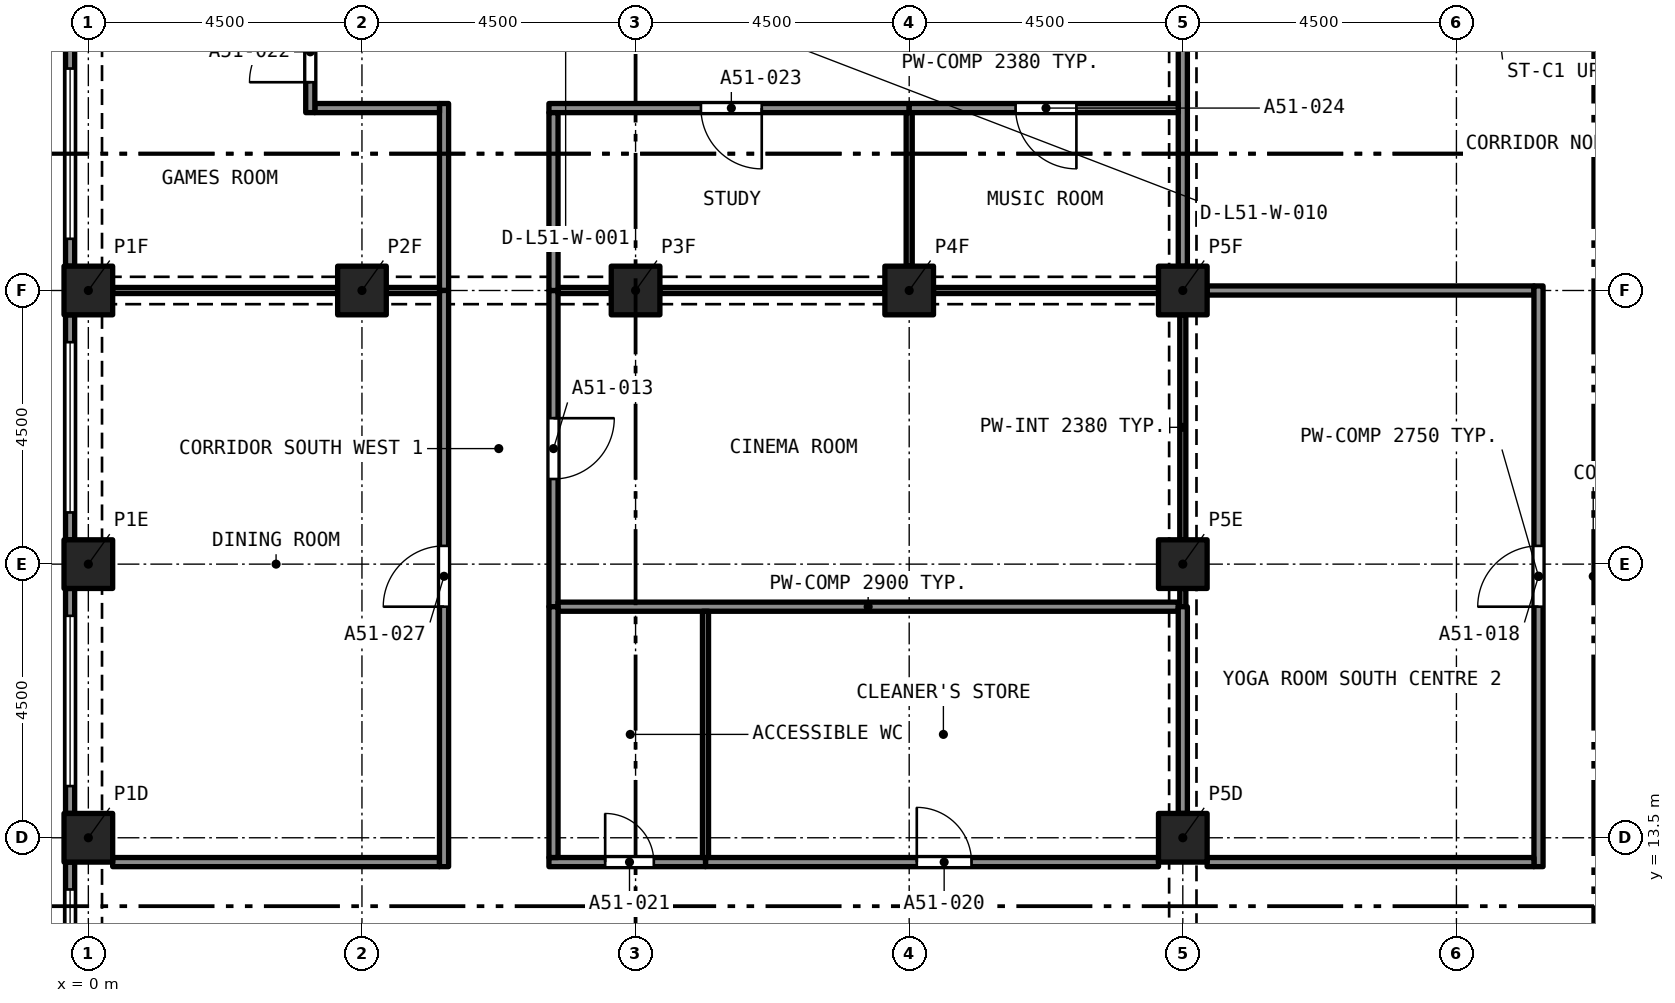
"""IFC4 building model, lengths in metres.
Left out: names, types, materials, properties, quantities, classifications, styles, units other than length and angle.
Written with IfcOpenShell. Run it as: python <this file> out.ifc"""

import sys

from ifc_helpers import new_model, si_unit, direction, frame, frame_2d, origin, origin_2d, place, context, subcontext, project, spatial, rectangle, extrude, element, fill, save


model = new_model("IFC4")
c1 = context("Model", 3, precision=1e-05, world=origin(), true_north=direction((0.0, 1.0)))
c2 = subcontext(c1, "Body", "Model", "MODEL_VIEW")
j1 = project(units=[si_unit("LENGTHUNIT", "METRE"), si_unit("PLANEANGLEUNIT", "RADIAN")], contexts=[c1])
p1 = place(None, origin())
s1 = spatial("IfcSite", under=j1, at=p1, CompositionType="ELEMENT")
p2 = place(p1, origin())
s2 = spatial("IfcBuilding", under=s1, at=p2, CompositionType="ELEMENT")
p3 = place(p2, frame((0.0, 0.0, 185.9)))
s3 = spatial("IfcBuildingStorey", under=s2, at=p3, CompositionType="ELEMENT", Elevation=185.9)
for number, where, z_axis, x_axis in (
    (1, (0.0, 13.5, 0.0), (0.0, 0.0, 1.0), (1.0, 0.0, 0.0)),
    (2, (18.0, 13.5, 0.0), (0.0, 0.0, 1.0), (1.0, 0.0, 0.0)),
    (3, (0.0, 18.0, 0.0), (0.0, 0.0, 1.0), (1.0, 0.0, 0.0)),
    (4, (18.0, 18.0, 0.0), (0.0, 0.0, 1.0), (1.0, 0.0, 0.0)),
    (5, (0.0, 22.5, 0.0), (0.0, 0.0, 1.0), (1.0, 0.0, 0.0)),
    (6, (4.5, 22.5, 0.0), (0.0, 0.0, 1.0), (1.0, 0.0, 0.0)),
    (7, (9.0, 22.5, 0.0), (0.0, 0.0, 1.0), (1.0, 0.0, 0.0)),
    (8, (13.5, 22.5, 0.0), (0.0, 0.0, 1.0), (1.0, 0.0, 0.0)),
    (9, (18.0, 22.5, 0.0), (0.0, 0.0, 1.0), (1.0, 0.0, 0.0)),
):
    element("IfcColumn", number, at=place(p3, frame(where, z_axis=z_axis, x_axis=x_axis)), inside=s3, PredefinedType="COLUMN", context=c2, shape_type="SweptSolid", body=[
        extrude(rectangle(XDim=0.8, YDim=0.8, at=origin_2d()), origin(), (0.0, 0.0, 1.0), 3.2),
    ])
p4 = place(p3, frame((-0.3, 22.9, 0.0), z_axis=(0.0, 0.0, 1.0), x_axis=(0.0, 1.0, 0.0)))
e10 = element("IfcWall", 10, at=p4, inside=s3, PredefinedType="SOLIDWALL", context=c2, shape_type="SweptSolid", body=[
    extrude(rectangle(XDim=3.7, YDim=0.15, at=frame_2d((1.85, 0.0))), origin(), (0.0, 0.0, 1.0), 3.2),
])
p5 = place(p4, frame((0.45, 0.0, 0.45)))
e11 = element("IfcOpeningElement", 11, at=p5, cuts=e10, PredefinedType="OPENING", context=c2, shape_type="SweptSolid", body=[
    extrude(rectangle(XDim=2.8, YDim=1.95, at=frame_2d((1.4, 0.975))), frame((0.0, 0.085, 0.0), z_axis=(0.0, -1.0, 0.0), x_axis=(1.0, 0.0, 0.0)), (0.0, 0.0, 1.0), 0.17),
])
p6 = place(p3, frame((-0.3, 18.4, 0.0), z_axis=(0.0, 0.0, 1.0), x_axis=(0.0, 1.0, 0.0)))
e12 = element("IfcWall", 12, at=p6, inside=s3, PredefinedType="SOLIDWALL", context=c2, shape_type="SweptSolid", body=[
    extrude(rectangle(XDim=3.7, YDim=0.15, at=frame_2d((1.85, 0.0))), origin(), (0.0, 0.0, 1.0), 3.2),
])
p7 = place(p6, frame((0.45, 0.0, 0.45)))
e13 = element("IfcOpeningElement", 13, at=p7, cuts=e12, PredefinedType="OPENING", context=c2, shape_type="SweptSolid", body=[
    extrude(rectangle(XDim=2.8, YDim=1.95, at=frame_2d((1.4, 0.975))), frame((0.0, 0.085, 0.0), z_axis=(0.0, -1.0, 0.0), x_axis=(1.0, 0.0, 0.0)), (0.0, 0.0, 1.0), 0.17),
])
p8 = place(p3, frame((-0.3, 13.9, 0.0), z_axis=(0.0, 0.0, 1.0), x_axis=(0.0, 1.0, 0.0)))
e14 = element("IfcWall", 14, at=p8, inside=s3, PredefinedType="SOLIDWALL", context=c2, shape_type="SweptSolid", body=[
    extrude(rectangle(XDim=3.7, YDim=0.15, at=frame_2d((1.85, 0.0))), origin(), (0.0, 0.0, 1.0), 3.2),
])
p9 = place(p8, frame((0.45, 0.0, 0.45)))
e15 = element("IfcOpeningElement", 15, at=p9, cuts=e14, PredefinedType="OPENING", context=c2, shape_type="SweptSolid", body=[
    extrude(rectangle(XDim=2.8, YDim=1.95, at=frame_2d((1.4, 0.975))), frame((0.0, 0.085, 0.0), z_axis=(0.0, -1.0, 0.0), x_axis=(1.0, 0.0, 0.0)), (0.0, 0.0, 1.0), 0.17),
])
p10 = place(p3, frame((-0.3, 9.4, 0.0), z_axis=(0.0, 0.0, 1.0), x_axis=(0.0, 1.0, 0.0)))
e16 = element("IfcWall", 16, at=p10, inside=s3, PredefinedType="SOLIDWALL", context=c2, shape_type="SweptSolid", body=[
    extrude(rectangle(XDim=3.7, YDim=0.15, at=frame_2d((1.85, 0.0))), origin(), (0.0, 0.0, 1.0), 3.2),
])
p11 = place(p10, frame((0.45, 0.0, 0.45)))
e17 = element("IfcOpeningElement", 17, at=p11, cuts=e16, PredefinedType="OPENING", context=c2, shape_type="SweptSolid", body=[
    extrude(rectangle(XDim=2.8, YDim=1.95, at=frame_2d((1.4, 0.975))), frame((0.0, 0.085, 0.0), z_axis=(0.0, -1.0, 0.0), x_axis=(1.0, 0.0, 0.0)), (0.0, 0.0, 1.0), 0.17),
])
p12 = place(p3, frame((18.0, 18.4, 0.0), z_axis=(0.0, 0.0, 1.0), x_axis=(0.0, 1.0, 0.0)))
e18 = element("IfcWall", 18, at=p12, inside=s3, PredefinedType="PARTITIONING", context=c2, shape_type="SweptSolid", body=[
    extrude(rectangle(XDim=3.7, YDim=0.1, at=frame_2d((1.85, 0.0))), origin(), (0.0, 0.0, 1.0), 2.38),
])
p13 = place(p3, frame((18.0, 17.3, 0.0), z_axis=(0.0, 0.0, 1.0), x_axis=(0.0, 1.0, 0.0)))
e19 = element("IfcWall", 19, at=p13, inside=s3, PredefinedType="PARTITIONING", context=c2, shape_type="SweptSolid", body=[
    extrude(rectangle(XDim=0.3, YDim=0.1, at=frame_2d((0.15, 0.0))), origin(), (0.0, 0.0, 1.0), 2.75),
])
p14 = place(p3, frame((7.65, 22.5, 0.0), z_axis=(0.0, 0.0, 1.0), x_axis=(0.0, -1.0, 0.0)))
e20 = element("IfcWall", 20, at=p14, inside=s3, PredefinedType="PARTITIONING", context=c2, shape_type="SweptSolid", body=[
    extrude(rectangle(XDim=5.2, YDim=0.15, at=frame_2d((2.6, 0.0))), origin(), (0.0, 0.0, 1.0), 2.9),
])
p15 = place(p14, frame((2.1, 0.0, 0.0)))
e21 = element("IfcOpeningElement", 21, at=p15, cuts=e20, PredefinedType="OPENING", context=c2, shape_type="SweptSolid", body=[
    extrude(rectangle(XDim=1.0, YDim=2.1, at=frame_2d((0.5, 1.05))), frame((0.0, 0.085, 0.0), z_axis=(0.0, -1.0, 0.0), x_axis=(1.0, 0.0, 0.0)), (0.0, 0.0, 1.0), 0.17),
])
p16 = place(p3, frame((7.725, 22.5, 0.0), z_axis=(0.0, 0.0, 1.0), x_axis=(1.0, 0.0, 0.0)))
e22 = element("IfcWall", 22, at=p16, inside=s3, PredefinedType="PARTITIONING", context=c2, shape_type="SweptSolid", body=[
    extrude(rectangle(XDim=0.875, YDim=0.1, at=frame_2d((0.438, 0.0))), origin(), (0.0, 0.0, 1.0), 2.38),
])
for number, where, z_axis, x_axis in (
    (23, (9.4, 22.5, 0.0), (0.0, 0.0, 1.0), (1.0, 0.0, 0.0)),
    (24, (13.9, 22.5, 0.0), (0.0, 0.0, 1.0), (1.0, 0.0, 0.0)),
):
    element("IfcWall", number, at=place(p3, frame(where, z_axis=z_axis, x_axis=x_axis)), inside=s3, PredefinedType="PARTITIONING", context=c2, shape_type="SweptSolid", body=[
        extrude(rectangle(XDim=3.7, YDim=0.1, at=frame_2d((1.85, 0.0))), origin(), (0.0, 0.0, 1.0), 2.38),
    ])
p17 = place(p3, frame((7.725, 17.3, 0.0), z_axis=(0.0, 0.0, 1.0), x_axis=(1.0, 0.0, 0.0)))
e25 = element("IfcWall", 25, at=p17, inside=s3, PredefinedType="PARTITIONING", context=c2, shape_type="SweptSolid", body=[
    extrude(rectangle(XDim=10.2, YDim=0.15, at=frame_2d((5.1, 0.0))), origin(), (0.0, 0.0, 1.0), 2.9),
])
p18 = place(p3, frame((18.4, 22.5, 0.0), z_axis=(0.0, 0.0, 1.0), x_axis=(1.0, 0.0, 0.0)))
e26 = element("IfcWall", 26, at=p18, inside=s3, PredefinedType="PARTITIONING", context=c2, shape_type="SweptSolid", body=[
    extrude(rectangle(XDim=5.375, YDim=0.15, at=frame_2d((2.688, 0.0))), origin(), (0.0, 0.0, 1.0), 2.75),
])
p19 = place(p3, frame((18.0, 22.9, 0.0), z_axis=(0.0, 0.0, 1.0), x_axis=(0.0, 1.0, 0.0)))
e27 = element("IfcWall", 27, at=p19, inside=s3, PredefinedType="PARTITIONING", context=c2, shape_type="SweptSolid", body=[
    extrude(rectangle(XDim=3.7, YDim=0.15, at=frame_2d((1.85, 0.0))), origin(), (0.0, 0.0, 1.0), 2.38),
])
p20 = place(p3, frame((23.85, 13.025, 0.0), z_axis=(0.0, 0.0, 1.0), x_axis=(0.0, 1.0, 0.0)))
e28 = element("IfcWall", 28, at=p20, inside=s3, PredefinedType="PARTITIONING", context=c2, shape_type="SweptSolid", body=[
    extrude(rectangle(XDim=9.55, YDim=0.15, at=frame_2d((4.775, 0.0))), origin(), (0.0, 0.0, 1.0), 2.75),
])
p21 = place(p20, frame((4.275, 0.0, 0.0)))
e29 = element("IfcOpeningElement", 29, at=p21, cuts=e28, PredefinedType="OPENING", context=c2, shape_type="SweptSolid", body=[
    extrude(rectangle(XDim=1.0, YDim=2.1, at=frame_2d((0.5, 1.05))), frame((0.0, 0.085, 0.0), z_axis=(0.0, -1.0, 0.0), x_axis=(1.0, 0.0, 0.0)), (0.0, 0.0, 1.0), 0.17),
])
p22 = place(p3, frame((18.4, 13.1, 0.0), z_axis=(0.0, 0.0, 1.0), x_axis=(1.0, 0.0, 0.0)))
e30 = element("IfcWall", 30, at=p22, inside=s3, PredefinedType="PARTITIONING", context=c2, shape_type="SweptSolid", body=[
    extrude(rectangle(XDim=5.375, YDim=0.15, at=frame_2d((2.688, 0.0))), origin(), (0.0, 0.0, 1.0), 2.75),
])
p23 = place(p3, frame((10.15, 13.1, 0.0), z_axis=(0.0, 0.0, 1.0), x_axis=(1.0, 0.0, 0.0)))
e31 = element("IfcWall", 31, at=p23, inside=s3, PredefinedType="PARTITIONING", context=c2, shape_type="SweptSolid", body=[
    extrude(rectangle(XDim=7.45, YDim=0.15, at=frame_2d((3.725, 0.0))), origin(), (0.0, 0.0, 1.0), 2.9),
])
p24 = place(p23, frame((3.475, 0.0, 0.0)))
e32 = element("IfcOpeningElement", 32, at=p24, cuts=e31, PredefinedType="OPENING", context=c2, shape_type="SweptSolid", body=[
    extrude(rectangle(XDim=0.9, YDim=2.1, at=frame_2d((0.45, 1.05))), frame((0.0, 0.085, 0.0), z_axis=(0.0, -1.0, 0.0), x_axis=(1.0, 0.0, 0.0)), (0.0, 0.0, 1.0), 0.17),
])
p25 = place(p3, frame((7.575, 13.1, 0.0), z_axis=(0.0, 0.0, 1.0), x_axis=(1.0, 0.0, 0.0)))
e33 = element("IfcWall", 33, at=p25, inside=s3, PredefinedType="PARTITIONING", context=c2, shape_type="SweptSolid", body=[
    extrude(rectangle(XDim=2.575, YDim=0.15, at=frame_2d((1.288, 0.0))), origin(), (0.0, 0.0, 1.0), 2.9),
])
p26 = place(p25, frame((0.925, 0.0, 0.0)))
e34 = element("IfcOpeningElement", 34, at=p26, cuts=e33, PredefinedType="OPENING", context=c2, shape_type="SweptSolid", body=[
    extrude(rectangle(XDim=0.8, YDim=2.1, at=frame_2d((0.4, 1.05))), frame((0.0, 0.085, 0.0), z_axis=(0.0, -1.0, 0.0), x_axis=(1.0, 0.0, 0.0)), (0.0, 0.0, 1.0), 0.17),
])
p27 = place(p3, frame((0.4, 13.1, 0.0), z_axis=(0.0, 0.0, 1.0), x_axis=(1.0, 0.0, 0.0)))
e35 = element("IfcWall", 35, at=p27, inside=s3, PredefinedType="PARTITIONING", context=c2, shape_type="SweptSolid", body=[
    extrude(rectangle(XDim=5.375, YDim=0.15, at=frame_2d((2.688, 0.0))), origin(), (0.0, 0.0, 1.0), 2.9),
])
p28 = place(p3, frame((18.0, 13.9, 0.0), z_axis=(0.0, 0.0, 1.0), x_axis=(0.0, 1.0, 0.0)))
e36 = element("IfcWall", 36, at=p28, inside=s3, PredefinedType="PARTITIONING", context=c2, shape_type="SweptSolid", body=[
    extrude(rectangle(XDim=3.4, YDim=0.15, at=frame_2d((1.7, 0.0))), origin(), (0.0, 0.0, 1.0), 2.38),
])
p29 = place(p3, frame((5.85, 22.5, 0.0), z_axis=(0.0, 0.0, 1.0), x_axis=(0.0, 1.0, 0.0)))
e37 = element("IfcWall", 37, at=p29, inside=s3, PredefinedType="PARTITIONING", context=c2, shape_type="SweptSolid", body=[
    extrude(rectangle(XDim=3.075, YDim=0.15, at=frame_2d((1.538, 0.0))), origin(), (0.0, 0.0, 1.0), 2.9),
])
p30 = place(p3, frame((3.725, 25.5, 0.0), z_axis=(0.0, 0.0, 1.0), x_axis=(1.0, 0.0, 0.0)))
e38 = element("IfcWall", 38, at=p30, inside=s3, PredefinedType="PARTITIONING", context=c2, shape_type="SweptSolid", body=[
    extrude(rectangle(XDim=2.05, YDim=0.15, at=frame_2d((1.025, 0.0))), origin(), (0.0, 0.0, 1.0), 2.9),
])
p31 = place(p3, frame((3.65, 25.425, 0.0), z_axis=(0.0, 0.0, 1.0), x_axis=(0.0, 1.0, 0.0)))
e39 = element("IfcWall", 39, at=p31, inside=s3, PredefinedType="PARTITIONING", context=c2, shape_type="SweptSolid", body=[
    extrude(rectangle(XDim=1.925, YDim=0.15, at=frame_2d((0.962, 0.0))), origin(), (0.0, 0.0, 1.0), 2.9),
])
p32 = place(p31, frame((0.5, 0.0, 0.0)))
e40 = element("IfcOpeningElement", 40, at=p32, cuts=e39, PredefinedType="OPENING", context=c2, shape_type="SweptSolid", body=[
    extrude(rectangle(XDim=1.0, YDim=2.1, at=frame_2d((0.5, 1.05))), frame((0.0, 0.085, 0.0), z_axis=(0.0, -1.0, 0.0), x_axis=(1.0, 0.0, 0.0)), (0.0, 0.0, 1.0), 0.17),
])
p33 = place(p3, frame((13.5, 25.5, 0.0), z_axis=(0.0, 0.0, 1.0), x_axis=(-1.0, 0.0, 0.0)))
e41 = element("IfcWall", 41, at=p33, inside=s3, PredefinedType="PARTITIONING", context=c2, shape_type="SweptSolid", body=[
    extrude(rectangle(XDim=5.925, YDim=0.15, at=frame_2d((2.962, 0.0))), origin(), (0.0, 0.0, 1.0), 2.9),
])
p34 = place(p33, frame((2.425, 0.0, 0.0)))
e42 = element("IfcOpeningElement", 42, at=p34, cuts=e41, PredefinedType="OPENING", context=c2, shape_type="SweptSolid", body=[
    extrude(rectangle(XDim=1.0, YDim=2.1, at=frame_2d((0.5, 1.05))), frame((0.0, 0.085, 0.0), z_axis=(0.0, -1.0, 0.0), x_axis=(1.0, 0.0, 0.0)), (0.0, 0.0, 1.0), 0.17),
])
p35 = place(p3, frame((7.65, 22.5, 0.0), z_axis=(0.0, 0.0, 1.0), x_axis=(0.0, 1.0, 0.0)))
e43 = element("IfcWall", 43, at=p35, inside=s3, PredefinedType="PARTITIONING", context=c2, shape_type="SweptSolid", body=[
    extrude(rectangle(XDim=2.925, YDim=0.15, at=frame_2d((1.462, 0.0))), origin(), (0.0, 0.0, 1.0), 2.9),
])
p36 = place(p3, frame((17.925, 25.5, 0.0), z_axis=(0.0, 0.0, 1.0), x_axis=(-1.0, 0.0, 0.0)))
e44 = element("IfcWall", 44, at=p36, inside=s3, PredefinedType="PARTITIONING", context=c2, shape_type="SweptSolid", body=[
    extrude(rectangle(XDim=4.425, YDim=0.15, at=frame_2d((2.212, 0.0))), origin(), (0.0, 0.0, 1.0), 2.9),
])
p37 = place(p36, frame((1.675, 0.0, 0.0)))
e45 = element("IfcOpeningElement", 45, at=p37, cuts=e44, PredefinedType="OPENING", context=c2, shape_type="SweptSolid", body=[
    extrude(rectangle(XDim=1.0, YDim=2.1, at=frame_2d((0.5, 1.05))), frame((0.0, 0.085, 0.0), z_axis=(0.0, -1.0, 0.0), x_axis=(1.0, 0.0, 0.0)), (0.0, 0.0, 1.0), 0.17),
])
p38 = place(p3, frame((7.65, 13.175, 0.0), z_axis=(0.0, 0.0, 1.0), x_axis=(0.0, 1.0, 0.0)))
e46 = element("IfcWall", 46, at=p38, inside=s3, PredefinedType="PARTITIONING", context=c2, shape_type="SweptSolid", body=[
    extrude(rectangle(XDim=4.125, YDim=0.15, at=frame_2d((2.062, 0.0))), origin(), (0.0, 0.0, 1.0), 2.9),
])
p39 = place(p3, frame((5.85, 13.025, 0.0), z_axis=(0.0, 0.0, 1.0), x_axis=(0.0, 1.0, 0.0)))
e47 = element("IfcWall", 47, at=p39, inside=s3, PredefinedType="PARTITIONING", context=c2, shape_type="SweptSolid", body=[
    extrude(rectangle(XDim=9.475, YDim=0.15, at=frame_2d((4.738, 0.0))), origin(), (0.0, 0.0, 1.0), 2.9),
])
p40 = place(p39, frame((4.275, 0.0, 0.0)))
e48 = element("IfcOpeningElement", 48, at=p40, cuts=e47, PredefinedType="OPENING", context=c2, shape_type="SweptSolid", body=[
    extrude(rectangle(XDim=1.0, YDim=2.1, at=frame_2d((0.5, 1.05))), frame((0.0, 0.085, 0.0), z_axis=(0.0, -1.0, 0.0), x_axis=(1.0, 0.0, 0.0)), (0.0, 0.0, 1.0), 0.17),
])
p41 = place(p3, frame((4.9, 22.5, 0.0), z_axis=(0.0, 0.0, 1.0), x_axis=(1.0, 0.0, 0.0)))
e49 = element("IfcWall", 49, at=p41, inside=s3, PredefinedType="PARTITIONING", context=c2, shape_type="SweptSolid", body=[
    extrude(rectangle(XDim=0.875, YDim=0.1, at=frame_2d((0.438, 0.0))), origin(), (0.0, 0.0, 1.0), 2.38),
])
p42 = place(p3, frame((0.4, 22.5, 0.0), z_axis=(0.0, 0.0, 1.0), x_axis=(1.0, 0.0, 0.0)))
e50 = element("IfcWall", 50, at=p42, inside=s3, PredefinedType="PARTITIONING", context=c2, shape_type="SweptSolid", body=[
    extrude(rectangle(XDim=3.7, YDim=0.1, at=frame_2d((1.85, 0.0))), origin(), (0.0, 0.0, 1.0), 2.38),
])
p43 = place(p3, frame((13.5, 22.9, 0.0), z_axis=(0.0, 0.0, 1.0), x_axis=(0.0, 1.0, 0.0)))
e51 = element("IfcWall", 51, at=p43, inside=s3, PredefinedType="PARTITIONING", context=c2, shape_type="SweptSolid", body=[
    extrude(rectangle(XDim=2.525, YDim=0.1, at=frame_2d((1.263, 0.0))), origin(), (0.0, 0.0, 1.0), 2.9),
])
p44 = place(p3, frame((10.15, 13.175, 0.0), z_axis=(0.0, 0.0, 1.0), x_axis=(0.0, 1.0, 0.0)))
e52 = element("IfcWall", 52, at=p44, inside=s3, PredefinedType="PARTITIONING", context=c2, shape_type="SweptSolid", body=[
    extrude(rectangle(XDim=4.05, YDim=0.1, at=frame_2d((2.025, 0.0))), origin(), (0.0, 0.0, 1.0), 2.9),
])
p45 = place(p5, origin())
e53 = element("IfcWindow", 53, at=p45, inside=s3, PartitioningType="SINGLE_PANEL", PredefinedType="WINDOW", context=c2, shape_type="SweptSolid", body=[
    extrude(rectangle(XDim=2.8, YDim=1.95, at=frame_2d((1.4, 0.975))), frame((0.0, 0.03, 0.0), z_axis=(0.0, -1.0, 0.0), x_axis=(1.0, 0.0, 0.0)), (0.0, 0.0, 1.0), 0.06),
])
fill(e11, e53)
p46 = place(p7, origin())
e54 = element("IfcWindow", 54, at=p46, inside=s3, PartitioningType="SINGLE_PANEL", PredefinedType="WINDOW", context=c2, shape_type="SweptSolid", body=[
    extrude(rectangle(XDim=2.8, YDim=1.95, at=frame_2d((1.4, 0.975))), frame((0.0, 0.03, 0.0), z_axis=(0.0, -1.0, 0.0), x_axis=(1.0, 0.0, 0.0)), (0.0, 0.0, 1.0), 0.06),
])
fill(e13, e54)
p47 = place(p9, origin())
e55 = element("IfcWindow", 55, at=p47, inside=s3, PartitioningType="SINGLE_PANEL", PredefinedType="WINDOW", context=c2, shape_type="SweptSolid", body=[
    extrude(rectangle(XDim=2.8, YDim=1.95, at=frame_2d((1.4, 0.975))), frame((0.0, 0.03, 0.0), z_axis=(0.0, -1.0, 0.0), x_axis=(1.0, 0.0, 0.0)), (0.0, 0.0, 1.0), 0.06),
])
fill(e15, e55)
p48 = place(p11, origin())
e56 = element("IfcWindow", 56, at=p48, inside=s3, PartitioningType="SINGLE_PANEL", PredefinedType="WINDOW", context=c2, shape_type="SweptSolid", body=[
    extrude(rectangle(XDim=2.8, YDim=1.95, at=frame_2d((1.4, 0.975))), frame((0.0, 0.03, 0.0), z_axis=(0.0, -1.0, 0.0), x_axis=(1.0, 0.0, 0.0)), (0.0, 0.0, 1.0), 0.06),
])
fill(e17, e56)
p49 = place(p15, origin())
e57 = element("IfcDoor", 57, at=p49, inside=s3, OperationType="SINGLE_SWING_RIGHT", PredefinedType="DOOR", context=c2, shape_type="SweptSolid", body=[
    extrude(rectangle(XDim=1.0, YDim=2.1, at=frame_2d((0.5, 1.05))), frame((0.0, 0.025, 0.0), z_axis=(0.0, -1.0, 0.0), x_axis=(1.0, 0.0, 0.0)), (0.0, 0.0, 1.0), 0.05),
])
fill(e21, e57)
p50 = place(p21, origin())
e58 = element("IfcDoor", 58, at=p50, inside=s3, OperationType="SINGLE_SWING_RIGHT", PredefinedType="DOOR", context=c2, shape_type="SweptSolid", body=[
    extrude(rectangle(XDim=1.0, YDim=2.1, at=frame_2d((0.5, 1.05))), frame((0.0, 0.025, 0.0), z_axis=(0.0, -1.0, 0.0), x_axis=(1.0, 0.0, 0.0)), (0.0, 0.0, 1.0), 0.05),
])
fill(e29, e58)
p51 = place(p24, origin())
e59 = element("IfcDoor", 59, at=p51, inside=s3, OperationType="SINGLE_SWING_RIGHT", PredefinedType="DOOR", context=c2, shape_type="SweptSolid", body=[
    extrude(rectangle(XDim=0.9, YDim=2.1, at=frame_2d((0.45, 1.05))), frame((0.0, 0.025, 0.0), z_axis=(0.0, -1.0, 0.0), x_axis=(1.0, 0.0, 0.0)), (0.0, 0.0, 1.0), 0.05),
])
fill(e32, e59)
p52 = place(p26, origin())
e60 = element("IfcDoor", 60, at=p52, inside=s3, OperationType="SINGLE_SWING_RIGHT", PredefinedType="DOOR", context=c2, shape_type="SweptSolid", body=[
    extrude(rectangle(XDim=0.8, YDim=2.1, at=frame_2d((0.4, 1.05))), frame((0.0, 0.025, 0.0), z_axis=(0.0, -1.0, 0.0), x_axis=(1.0, 0.0, 0.0)), (0.0, 0.0, 1.0), 0.05),
])
fill(e34, e60)
p53 = place(p32, origin())
e61 = element("IfcDoor", 61, at=p53, inside=s3, OperationType="SINGLE_SWING_RIGHT", PredefinedType="DOOR", context=c2, shape_type="SweptSolid", body=[
    extrude(rectangle(XDim=1.0, YDim=2.1, at=frame_2d((0.5, 1.05))), frame((0.0, 0.025, 0.0), z_axis=(0.0, -1.0, 0.0), x_axis=(1.0, 0.0, 0.0)), (0.0, 0.0, 1.0), 0.05),
])
fill(e40, e61)
p54 = place(p34, origin())
e62 = element("IfcDoor", 62, at=p54, inside=s3, OperationType="SINGLE_SWING_LEFT", PredefinedType="DOOR", context=c2, shape_type="SweptSolid", body=[
    extrude(rectangle(XDim=1.0, YDim=2.1, at=frame_2d((0.5, 1.05))), frame((0.0, 0.025, 0.0), z_axis=(0.0, -1.0, 0.0), x_axis=(1.0, 0.0, 0.0)), (0.0, 0.0, 1.0), 0.05),
])
fill(e42, e62)
p55 = place(p37, origin())
e63 = element("IfcDoor", 63, at=p55, inside=s3, OperationType="SINGLE_SWING_LEFT", PredefinedType="DOOR", context=c2, shape_type="SweptSolid", body=[
    extrude(rectangle(XDim=1.0, YDim=2.1, at=frame_2d((0.5, 1.05))), frame((0.0, 0.025, 0.0), z_axis=(0.0, -1.0, 0.0), x_axis=(1.0, 0.0, 0.0)), (0.0, 0.0, 1.0), 0.05),
])
fill(e45, e63)
p56 = place(p40, origin())
e64 = element("IfcDoor", 64, at=p56, inside=s3, OperationType="SINGLE_SWING_RIGHT", PredefinedType="DOOR", context=c2, shape_type="SweptSolid", body=[
    extrude(rectangle(XDim=1.0, YDim=2.1, at=frame_2d((0.5, 1.05))), frame((0.0, 0.025, 0.0), z_axis=(0.0, -1.0, 0.0), x_axis=(1.0, 0.0, 0.0)), (0.0, 0.0, 1.0), 0.05),
])
fill(e48, e64)
save(model, sys.argv[1])
